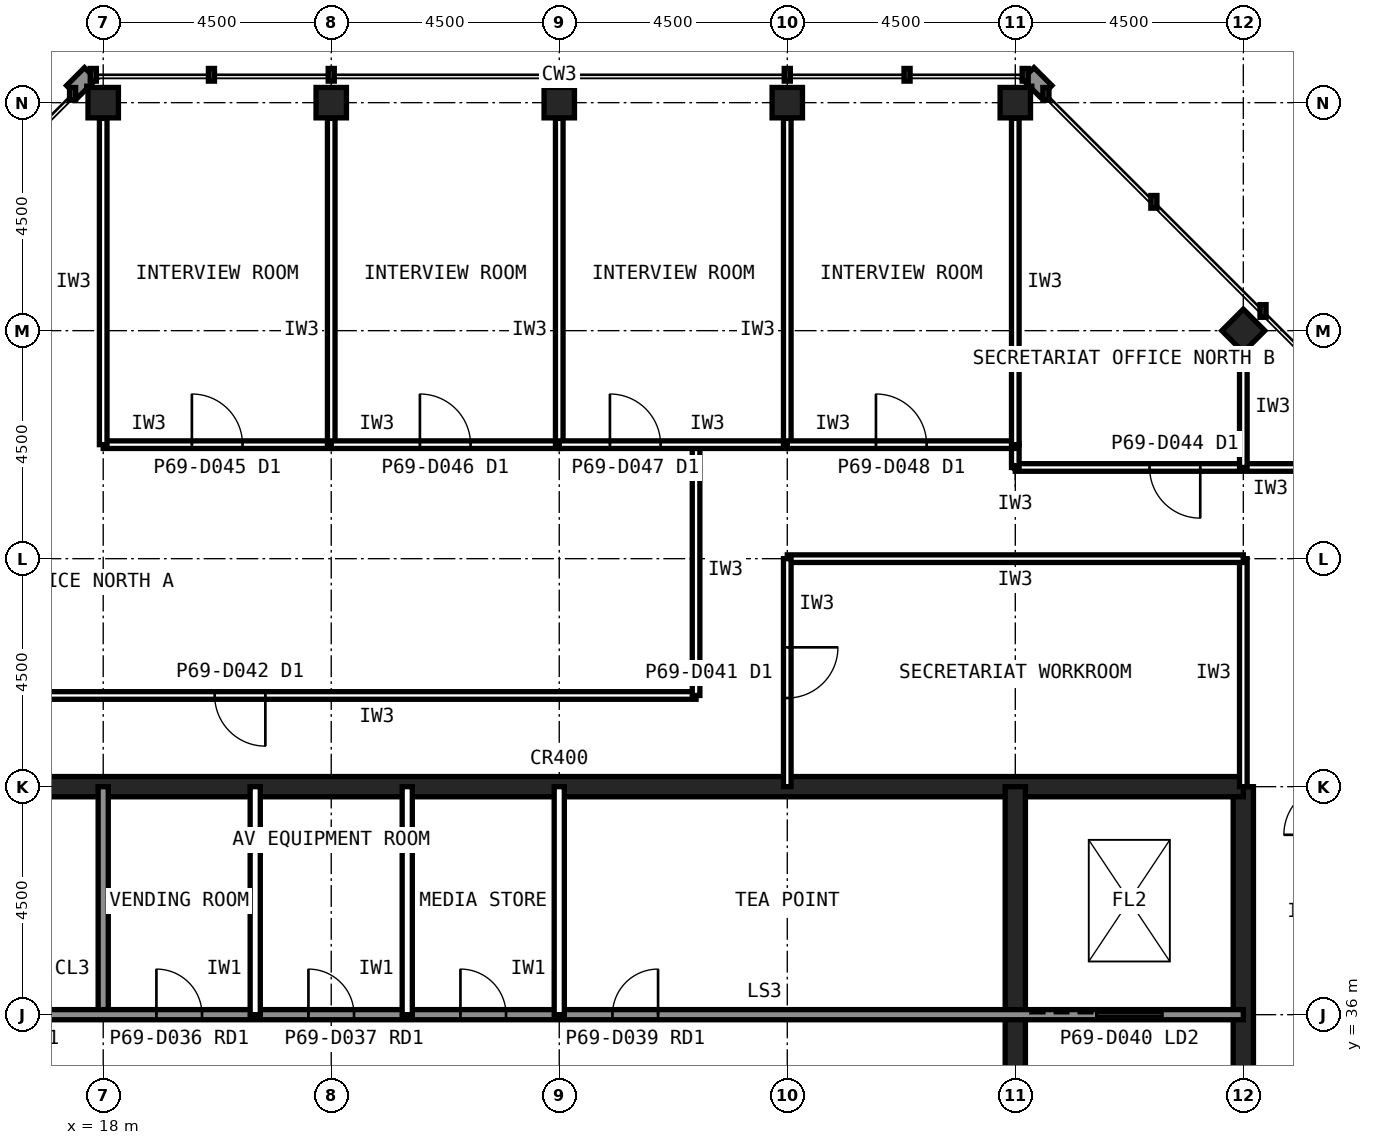
"""IFC4 building model, lengths in metres.
Left out: names, types, materials, properties, quantities, classifications, styles, units other than length and angle.
Written with IfcOpenShell. Run it as: python <this file> out.ifc"""

import sys

from ifc_helpers import new_model, si_unit, direction, frame, frame_2d, origin, origin_2d, place, context, subcontext, project, spatial, rectangle, hollow_rectangle, extrude, element, fill, save


model = new_model("IFC4")
c1 = context("Model", 3, precision=1e-05, world=origin(), true_north=direction((0.0, 1.0)))
c2 = subcontext(c1, "Body", "Model", "MODEL_VIEW")
j1 = project(units=[si_unit("LENGTHUNIT", "METRE"), si_unit("PLANEANGLEUNIT", "RADIAN")], contexts=[c1])
p1 = place(None, origin())
s1 = spatial("IfcSite", under=j1, at=p1, CompositionType="ELEMENT")
p2 = place(p1, origin())
s2 = spatial("IfcBuilding", under=s1, at=p2, CompositionType="ELEMENT")
p3 = place(p2, frame((0.0, 0.0, 286.6)))
s3 = spatial("IfcBuildingStorey", under=s2, at=p3, CompositionType="ELEMENT", Elevation=286.6)
for number, where, z_axis, x_axis in (
    (1, (36.0, 54.0, 0.0), (0.0, 0.0, 1.0), (1.0, 0.0, 0.0)),
    (2, (31.5, 54.0, 0.0), (0.0, 0.0, 1.0), (1.0, 0.0, 0.0)),
    (3, (27.0, 54.0, 0.0), (0.0, 0.0, 1.0), (1.0, 0.0, 0.0)),
    (4, (22.5, 54.0, 0.0), (0.0, 0.0, 1.0), (1.0, 0.0, 0.0)),
    (5, (18.0, 54.0, 0.0), (0.0, 0.0, 1.0), (1.0, 0.0, 0.0)),
    (6, (40.5, 49.5, 0.0), (0.0, 0.0, 1.0), (0.707, 0.707, 0.0)),
):
    element("IfcColumn", number, at=place(p3, frame(where, z_axis=z_axis, x_axis=x_axis)), inside=s3, PredefinedType="COLUMN", context=c2, shape_type="SweptSolid", body=[
        extrude(hollow_rectangle(XDim=0.6, YDim=0.6, WallThickness=0.028, at=origin_2d()), origin(), (0.0, 0.0, 1.0), 4.0),
    ])
p4 = place(p3, frame((40.5, 13.5, 0.0), z_axis=(0.0, 0.0, 1.0), x_axis=(0.0, 1.0, 0.0)))
e7 = element("IfcWall", 7, at=p4, inside=s3, PredefinedType="SHEAR", context=c2, shape_type="SweptSolid", body=[
    extrude(rectangle(XDim=27.0, YDim=0.4, at=frame_2d((13.5, 0.0))), origin(), (0.0, 0.0, 1.0), 4.0),
])
p5 = place(p4, frame((5.85, 0.0, 0.0)))
e8 = element("IfcOpeningElement", 8, at=p5, cuts=e7, PredefinedType="OPENING", context=c2, shape_type="SweptSolid", body=[
    extrude(rectangle(XDim=1.8, YDim=2.1, at=frame_2d((0.9, 1.05))), frame((0.0, 0.21, 0.0), z_axis=(0.0, -1.0, 0.0), x_axis=(1.0, 0.0, 0.0)), (0.0, 0.0, 1.0), 0.42),
])
p6 = place(p4, frame((19.65, 0.0, 0.0)))
e9 = element("IfcOpeningElement", 9, at=p6, cuts=e7, PredefinedType="OPENING", context=c2, shape_type="SweptSolid", body=[
    extrude(rectangle(XDim=1.2, YDim=2.1, at=frame_2d((0.6, 1.05))), frame((0.0, 0.21, 0.0), z_axis=(0.0, -1.0, 0.0), x_axis=(1.0, 0.0, 0.0)), (0.0, 0.0, 1.0), 0.42),
])
p7 = place(p3, frame((40.5, 40.5, 0.0), z_axis=(0.0, 0.0, 1.0), x_axis=(-1.0, 0.0, 0.0)))
e10 = element("IfcWall", 10, at=p7, inside=s3, PredefinedType="SHEAR", context=c2, shape_type="SweptSolid", body=[
    extrude(rectangle(XDim=27.0, YDim=0.4, at=frame_2d((13.5, 0.0))), origin(), (0.0, 0.0, 1.0), 4.0),
])
p8 = place(p3, frame((18.0, 36.0, 0.0), z_axis=(0.0, 0.0, 1.0), x_axis=(0.0, 1.0, 0.0)))
e11 = element("IfcWall", 11, at=p8, inside=s3, PredefinedType="SOLIDWALL", context=c2, shape_type="SweptSolid", body=[
    extrude(rectangle(XDim=4.5, YDim=0.2, at=frame_2d((2.25, 0.0))), origin(), (0.0, 0.0, 1.0), 3.84),
])
p9 = place(p3, frame((36.0, 22.5, 0.0), z_axis=(0.0, 0.0, 1.0), x_axis=(0.0, 1.0, 0.0)))
e12 = element("IfcWall", 12, at=p9, inside=s3, PredefinedType="SHEAR", context=c2, shape_type="SweptSolid", body=[
    extrude(rectangle(XDim=18.0, YDim=0.4, at=frame_2d((9.0, 0.0))), origin(), (0.0, 0.0, 1.0), 4.0),
])
p10 = place(p3, frame((13.5, 36.0, 0.0), z_axis=(0.0, 0.0, 1.0), x_axis=(1.0, 0.0, 0.0)))
e13 = element("IfcWall", 13, at=p10, inside=s3, PredefinedType="SOLIDWALL", context=c2, shape_type="SweptSolid", body=[
    extrude(rectangle(XDim=27.0, YDim=0.2, at=frame_2d((13.5, 0.0))), origin(), (0.0, 0.0, 1.0), 3.84),
])
p11 = place(p10, frame((1.8, 0.0, 0.0)))
e14 = element("IfcOpeningElement", 14, at=p11, cuts=e13, PredefinedType="OPENING", context=c2, shape_type="SweptSolid", body=[
    extrude(rectangle(XDim=0.9, YDim=2.1, at=frame_2d((0.45, 1.05))), frame((0.0, 0.11, 0.0), z_axis=(0.0, -1.0, 0.0), x_axis=(1.0, 0.0, 0.0)), (0.0, 0.0, 1.0), 0.22),
])
p12 = place(p10, frame((5.55, 0.0, 0.0)))
e15 = element("IfcOpeningElement", 15, at=p12, cuts=e13, PredefinedType="OPENING", context=c2, shape_type="SweptSolid", body=[
    extrude(rectangle(XDim=0.9, YDim=2.1, at=frame_2d((0.45, 1.05))), frame((0.0, 0.11, 0.0), z_axis=(0.0, -1.0, 0.0), x_axis=(1.0, 0.0, 0.0)), (0.0, 0.0, 1.0), 0.22),
])
p13 = place(p10, frame((14.55, 0.0, 0.0)))
e16 = element("IfcOpeningElement", 16, at=p13, cuts=e13, PredefinedType="OPENING", context=c2, shape_type="SweptSolid", body=[
    extrude(rectangle(XDim=0.9, YDim=2.1, at=frame_2d((0.45, 1.05))), frame((0.0, 0.11, 0.0), z_axis=(0.0, -1.0, 0.0), x_axis=(1.0, 0.0, 0.0)), (0.0, 0.0, 1.0), 0.22),
])
p14 = place(p10, frame((17.55, 0.0, 0.0)))
e17 = element("IfcOpeningElement", 17, at=p14, cuts=e13, PredefinedType="OPENING", context=c2, shape_type="SweptSolid", body=[
    extrude(rectangle(XDim=0.9, YDim=2.1, at=frame_2d((0.45, 1.05))), frame((0.0, 0.11, 0.0), z_axis=(0.0, -1.0, 0.0), x_axis=(1.0, 0.0, 0.0)), (0.0, 0.0, 1.0), 0.22),
])
p15 = place(p10, frame((24.1, 0.0, 0.0)))
e18 = element("IfcOpeningElement", 18, at=p15, cuts=e13, PredefinedType="OPENING", context=c2, shape_type="SweptSolid", body=[
    extrude(rectangle(XDim=1.3, YDim=2.2, at=frame_2d((0.65, 1.1))), frame((0.0, 0.11, 0.0), z_axis=(0.0, -1.0, 0.0), x_axis=(1.0, 0.0, 0.0)), (0.0, 0.0, 1.0), 0.22),
])
for number, where, z_axis, x_axis in (
    (19, (27.0, 36.0, 0.0), (0.0, 0.0, 1.0), (0.0, 1.0, 0.0)),
    (20, (30.0, 36.0, 0.0), (0.0, 0.0, 1.0), (0.0, 1.0, 0.0)),
):
    element("IfcWall", number, at=place(p3, frame(where, z_axis=z_axis, x_axis=x_axis)), inside=s3, PredefinedType="PARTITIONING", context=c2, shape_type="SweptSolid", body=[
        extrude(rectangle(XDim=4.5, YDim=0.2, at=frame_2d((2.25, 0.0))), origin(), (0.0, 0.0, 1.0), 3.84),
    ])
p16 = place(p3, frame((29.7, 42.3, 0.0), z_axis=(0.0, 0.0, 1.0), x_axis=(-1.0, 0.0, 0.0)))
e21 = element("IfcWall", 21, at=p16, inside=s3, PredefinedType="PARTITIONING", context=c2, shape_type="SweptSolid", body=[
    extrude(rectangle(XDim=18.0, YDim=0.15, at=frame_2d((9.0, 0.0))), origin(), (0.0, 0.0, 1.0), 3.84),
])
p17 = place(p16, frame((8.5, 0.0, 0.0)))
e22 = element("IfcOpeningElement", 22, at=p17, cuts=e21, PredefinedType="OPENING", context=c2, shape_type="SweptSolid", body=[
    extrude(rectangle(XDim=1.0, YDim=2.1, at=frame_2d((0.5, 1.05))), frame((0.0, 0.085, 0.0), z_axis=(0.0, -1.0, 0.0), x_axis=(1.0, 0.0, 0.0)), (0.0, 0.0, 1.0), 0.17),
])
p18 = place(p3, frame((29.7, 47.25, 0.0), z_axis=(0.0, 0.0, 1.0), x_axis=(0.0, -1.0, 0.0)))
e23 = element("IfcWall", 23, at=p18, inside=s3, PredefinedType="PARTITIONING", context=c2, shape_type="SweptSolid", body=[
    extrude(rectangle(XDim=4.95, YDim=0.15, at=frame_2d((2.475, 0.0))), origin(), (0.0, 0.0, 1.0), 3.84),
])
p19 = place(p3, frame((42.3, 46.8, 0.0), z_axis=(0.0, 0.0, 1.0), x_axis=(-1.0, 0.0, 0.0)))
e24 = element("IfcWall", 24, at=p19, inside=s3, PredefinedType="PARTITIONING", context=c2, shape_type="SweptSolid", body=[
    extrude(rectangle(XDim=6.3, YDim=0.15, at=frame_2d((3.15, 0.0))), origin(), (0.0, 0.0, 1.0), 3.84),
])
p20 = place(p19, frame((2.65, 0.0, 0.0)))
e25 = element("IfcOpeningElement", 25, at=p20, cuts=e24, PredefinedType="OPENING", context=c2, shape_type="SweptSolid", body=[
    extrude(rectangle(XDim=1.0, YDim=2.1, at=frame_2d((0.5, 1.05))), frame((0.0, 0.085, 0.0), z_axis=(0.0, -1.0, 0.0), x_axis=(1.0, 0.0, 0.0)), (0.0, 0.0, 1.0), 0.17),
])
p21 = place(p3, frame((36.0, 46.8, 0.0), z_axis=(0.0, 0.0, 1.0), x_axis=(0.0, 1.0, 0.0)))
e26 = element("IfcWall", 26, at=p21, inside=s3, PredefinedType="PARTITIONING", context=c2, shape_type="SweptSolid", body=[
    extrude(rectangle(XDim=0.46, YDim=0.15, at=frame_2d((0.23, 0.0))), origin(), (0.0, 0.0, 1.0), 2.989),
])
p22 = place(p3, frame((40.5, 40.5, 0.0), z_axis=(0.0, 0.0, 1.0), x_axis=(0.0, 1.0, 0.0)))
e27 = element("IfcWall", 27, at=p22, inside=s3, PredefinedType="PARTITIONING", context=c2, shape_type="SweptSolid", body=[
    extrude(rectangle(XDim=4.5, YDim=0.15, at=frame_2d((2.25, 0.0))), origin(), (0.0, 0.0, 1.0), 2.989),
])
p23 = place(p3, frame((40.5, 45.0, 0.0), z_axis=(0.0, 0.0, 1.0), x_axis=(-1.0, 0.0, 0.0)))
e28 = element("IfcWall", 28, at=p23, inside=s3, PredefinedType="PARTITIONING", context=c2, shape_type="SweptSolid", body=[
    extrude(rectangle(XDim=9.0, YDim=0.15, at=frame_2d((4.5, 0.0))), origin(), (0.0, 0.0, 1.0), 3.84),
])
p24 = place(p3, frame((31.5, 45.0, 0.0), z_axis=(0.0, 0.0, 1.0), x_axis=(0.0, -1.0, 0.0)))
e29 = element("IfcWall", 29, at=p24, inside=s3, PredefinedType="PARTITIONING", context=c2, shape_type="SweptSolid", body=[
    extrude(rectangle(XDim=4.5, YDim=0.15, at=frame_2d((2.25, 0.0))), origin(), (0.0, 0.0, 1.0), 2.989),
])
p25 = place(p24, frame((1.75, 0.0, 0.0)))
e30 = element("IfcOpeningElement", 30, at=p25, cuts=e29, PredefinedType="OPENING", context=c2, shape_type="SweptSolid", body=[
    extrude(rectangle(XDim=1.0, YDim=2.1, at=frame_2d((0.5, 1.05))), frame((0.0, 0.085, 0.0), z_axis=(0.0, -1.0, 0.0), x_axis=(1.0, 0.0, 0.0)), (0.0, 0.0, 1.0), 0.17),
])
p26 = place(p3, frame((18.0, 47.25, 0.0), z_axis=(0.0, 0.0, 1.0), x_axis=(1.0, 0.0, 0.0)))
e31 = element("IfcWall", 31, at=p26, inside=s3, PredefinedType="PARTITIONING", context=c2, shape_type="SweptSolid", body=[
    extrude(rectangle(XDim=4.5, YDim=0.15, at=frame_2d((2.25, 0.0))), origin(), (0.0, 0.0, 1.0), 3.84),
])
p27 = place(p26, frame((1.75, 0.0, 0.0)))
e32 = element("IfcOpeningElement", 32, at=p27, cuts=e31, PredefinedType="OPENING", context=c2, shape_type="SweptSolid", body=[
    extrude(rectangle(XDim=1.0, YDim=2.1, at=frame_2d((0.5, 1.05))), frame((0.0, 0.085, 0.0), z_axis=(0.0, -1.0, 0.0), x_axis=(1.0, 0.0, 0.0)), (0.0, 0.0, 1.0), 0.17),
])
for number, where, z_axis, x_axis in (
    (33, (22.5, 47.25, 0.0), (0.0, 0.0, 1.0), (0.0, 1.0, 0.0)),
    (34, (18.0, 53.69, 0.0), (0.0, 0.0, 1.0), (0.0, -1.0, 0.0)),
):
    element("IfcWall", number, at=place(p3, frame(where, z_axis=z_axis, x_axis=x_axis)), inside=s3, PredefinedType="PARTITIONING", context=c2, shape_type="SweptSolid", body=[
        extrude(rectangle(XDim=6.44, YDim=0.15, at=frame_2d((3.22, 0.0))), origin(), (0.0, 0.0, 1.0), 2.989),
    ])
p28 = place(p3, frame((22.5, 47.25, 0.0), z_axis=(0.0, 0.0, 1.0), x_axis=(1.0, 0.0, 0.0)))
e35 = element("IfcWall", 35, at=p28, inside=s3, PredefinedType="PARTITIONING", context=c2, shape_type="SweptSolid", body=[
    extrude(rectangle(XDim=4.5, YDim=0.15, at=frame_2d((2.25, 0.0))), origin(), (0.0, 0.0, 1.0), 3.84),
])
p29 = place(p28, frame((1.75, 0.0, 0.0)))
e36 = element("IfcOpeningElement", 36, at=p29, cuts=e35, PredefinedType="OPENING", context=c2, shape_type="SweptSolid", body=[
    extrude(rectangle(XDim=1.0, YDim=2.1, at=frame_2d((0.5, 1.05))), frame((0.0, 0.085, 0.0), z_axis=(0.0, -1.0, 0.0), x_axis=(1.0, 0.0, 0.0)), (0.0, 0.0, 1.0), 0.17),
])
p30 = place(p3, frame((27.0, 47.25, 0.0), z_axis=(0.0, 0.0, 1.0), x_axis=(0.0, 1.0, 0.0)))
e37 = element("IfcWall", 37, at=p30, inside=s3, PredefinedType="PARTITIONING", context=c2, shape_type="SweptSolid", body=[
    extrude(rectangle(XDim=6.44, YDim=0.15, at=frame_2d((3.22, 0.0))), origin(), (0.0, 0.0, 1.0), 2.989),
])
p31 = place(p3, frame((27.0, 47.25, 0.0), z_axis=(0.0, 0.0, 1.0), x_axis=(1.0, 0.0, 0.0)))
e38 = element("IfcWall", 38, at=p31, inside=s3, PredefinedType="PARTITIONING", context=c2, shape_type="SweptSolid", body=[
    extrude(rectangle(XDim=4.5, YDim=0.15, at=frame_2d((2.25, 0.0))), origin(), (0.0, 0.0, 1.0), 3.84),
])
p32 = place(p31, frame((1.0, 0.0, 0.0)))
e39 = element("IfcOpeningElement", 39, at=p32, cuts=e38, PredefinedType="OPENING", context=c2, shape_type="SweptSolid", body=[
    extrude(rectangle(XDim=1.0, YDim=2.1, at=frame_2d((0.5, 1.05))), frame((0.0, 0.085, 0.0), z_axis=(0.0, -1.0, 0.0), x_axis=(1.0, 0.0, 0.0)), (0.0, 0.0, 1.0), 0.17),
])
p33 = place(p3, frame((31.5, 47.25, 0.0), z_axis=(0.0, 0.0, 1.0), x_axis=(0.0, 1.0, 0.0)))
e40 = element("IfcWall", 40, at=p33, inside=s3, PredefinedType="PARTITIONING", context=c2, shape_type="SweptSolid", body=[
    extrude(rectangle(XDim=6.44, YDim=0.15, at=frame_2d((3.22, 0.0))), origin(), (0.0, 0.0, 1.0), 2.989),
])
p34 = place(p3, frame((31.5, 47.25, 0.0), z_axis=(0.0, 0.0, 1.0), x_axis=(1.0, 0.0, 0.0)))
e41 = element("IfcWall", 41, at=p34, inside=s3, PredefinedType="PARTITIONING", context=c2, shape_type="SweptSolid", body=[
    extrude(rectangle(XDim=4.5, YDim=0.15, at=frame_2d((2.25, 0.0))), origin(), (0.0, 0.0, 1.0), 3.84),
])
p35 = place(p34, frame((1.75, 0.0, 0.0)))
e42 = element("IfcOpeningElement", 42, at=p35, cuts=e41, PredefinedType="OPENING", context=c2, shape_type="SweptSolid", body=[
    extrude(rectangle(XDim=1.0, YDim=2.1, at=frame_2d((0.5, 1.05))), frame((0.0, 0.085, 0.0), z_axis=(0.0, -1.0, 0.0), x_axis=(1.0, 0.0, 0.0)), (0.0, 0.0, 1.0), 0.17),
])
p36 = place(p3, frame((36.0, 47.25, 0.0), z_axis=(0.0, 0.0, 1.0), x_axis=(0.0, 1.0, 0.0)))
e43 = element("IfcWall", 43, at=p36, inside=s3, PredefinedType="PARTITIONING", context=c2, shape_type="SweptSolid", body=[
    extrude(rectangle(XDim=6.44, YDim=0.15, at=frame_2d((3.22, 0.0))), origin(), (0.0, 0.0, 1.0), 2.989),
])
p37 = place(p3, frame((40.5, 49.18, 0.0), z_axis=(0.0, 0.0, 1.0), x_axis=(0.0, -1.0, 0.0)))
e44 = element("IfcWall", 44, at=p37, inside=s3, PredefinedType="PARTITIONING", context=c2, shape_type="SweptSolid", body=[
    extrude(rectangle(XDim=2.38, YDim=0.15, at=frame_2d((1.19, 0.0))), origin(), (0.0, 0.0, 1.0), 2.989),
])
p38 = place(p12, origin())
e45 = element("IfcDoor", 45, at=p38, inside=s3, OperationType="SINGLE_SWING_LEFT", PredefinedType="DOOR", context=c2, shape_type="SweptSolid", body=[
    extrude(rectangle(XDim=0.9, YDim=2.1, at=frame_2d((0.45, 1.05))), frame((0.0, 0.025, 0.0), z_axis=(0.0, -1.0, 0.0), x_axis=(1.0, 0.0, 0.0)), (0.0, 0.0, 1.0), 0.05),
])
fill(e15, e45)
p39 = place(p13, origin())
e46 = element("IfcDoor", 46, at=p39, inside=s3, OperationType="SINGLE_SWING_RIGHT", PredefinedType="DOOR", context=c2, shape_type="SweptSolid", body=[
    extrude(rectangle(XDim=0.9, YDim=2.1, at=frame_2d((0.45, 1.05))), frame((0.0, 0.025, 0.0), z_axis=(0.0, -1.0, 0.0), x_axis=(1.0, 0.0, 0.0)), (0.0, 0.0, 1.0), 0.05),
])
fill(e16, e46)
p40 = place(p14, origin())
e47 = element("IfcDoor", 47, at=p40, inside=s3, OperationType="SINGLE_SWING_RIGHT", PredefinedType="DOOR", context=c2, shape_type="SweptSolid", body=[
    extrude(rectangle(XDim=0.9, YDim=2.1, at=frame_2d((0.45, 1.05))), frame((0.0, 0.025, 0.0), z_axis=(0.0, -1.0, 0.0), x_axis=(1.0, 0.0, 0.0)), (0.0, 0.0, 1.0), 0.05),
])
fill(e17, e47)
p41 = place(p15, origin())
e48 = element("IfcDoor", 48, at=p41, inside=s3, OperationType="SLIDING_TO_LEFT", PredefinedType="DOOR", context=c2, shape_type="SweptSolid", body=[
    extrude(rectangle(XDim=1.3, YDim=2.2, at=frame_2d((0.65, 1.1))), frame((0.0, 0.025, 0.0), z_axis=(0.0, -1.0, 0.0), x_axis=(1.0, 0.0, 0.0)), (0.0, 0.0, 1.0), 0.05),
])
fill(e18, e48)
p42 = place(p17, origin())
e49 = element("IfcDoor", 49, at=p42, inside=s3, OperationType="SINGLE_SWING_LEFT", PredefinedType="DOOR", context=c2, shape_type="SweptSolid", body=[
    extrude(rectangle(XDim=1.0, YDim=2.1, at=frame_2d((0.5, 1.05))), frame((0.0, 0.025, 0.0), z_axis=(0.0, -1.0, 0.0), x_axis=(1.0, 0.0, 0.0)), (0.0, 0.0, 1.0), 0.05),
])
fill(e22, e49)
p43 = place(p20, origin())
e50 = element("IfcDoor", 50, at=p43, inside=s3, OperationType="SINGLE_SWING_LEFT", PredefinedType="DOOR", context=c2, shape_type="SweptSolid", body=[
    extrude(rectangle(XDim=1.0, YDim=2.1, at=frame_2d((0.5, 1.05))), frame((0.0, 0.025, 0.0), z_axis=(0.0, -1.0, 0.0), x_axis=(1.0, 0.0, 0.0)), (0.0, 0.0, 1.0), 0.05),
])
fill(e25, e50)
p44 = place(p25, origin())
e51 = element("IfcDoor", 51, at=p44, inside=s3, OperationType="SINGLE_SWING_LEFT", PredefinedType="DOOR", context=c2, shape_type="SweptSolid", body=[
    extrude(rectangle(XDim=1.0, YDim=2.1, at=frame_2d((0.5, 1.05))), frame((0.0, 0.025, 0.0), z_axis=(0.0, -1.0, 0.0), x_axis=(1.0, 0.0, 0.0)), (0.0, 0.0, 1.0), 0.05),
])
fill(e30, e51)
p45 = place(p27, origin())
e52 = element("IfcDoor", 52, at=p45, inside=s3, OperationType="SINGLE_SWING_LEFT", PredefinedType="DOOR", context=c2, shape_type="SweptSolid", body=[
    extrude(rectangle(XDim=1.0, YDim=2.1, at=frame_2d((0.5, 1.05))), frame((0.0, 0.025, 0.0), z_axis=(0.0, -1.0, 0.0), x_axis=(1.0, 0.0, 0.0)), (0.0, 0.0, 1.0), 0.05),
])
fill(e32, e52)
p46 = place(p29, origin())
e53 = element("IfcDoor", 53, at=p46, inside=s3, OperationType="SINGLE_SWING_LEFT", PredefinedType="DOOR", context=c2, shape_type="SweptSolid", body=[
    extrude(rectangle(XDim=1.0, YDim=2.1, at=frame_2d((0.5, 1.05))), frame((0.0, 0.025, 0.0), z_axis=(0.0, -1.0, 0.0), x_axis=(1.0, 0.0, 0.0)), (0.0, 0.0, 1.0), 0.05),
])
fill(e36, e53)
p47 = place(p32, origin())
e54 = element("IfcDoor", 54, at=p47, inside=s3, OperationType="SINGLE_SWING_LEFT", PredefinedType="DOOR", context=c2, shape_type="SweptSolid", body=[
    extrude(rectangle(XDim=1.0, YDim=2.1, at=frame_2d((0.5, 1.05))), frame((0.0, 0.025, 0.0), z_axis=(0.0, -1.0, 0.0), x_axis=(1.0, 0.0, 0.0)), (0.0, 0.0, 1.0), 0.05),
])
fill(e39, e54)
p48 = place(p35, origin())
e55 = element("IfcDoor", 55, at=p48, inside=s3, OperationType="SINGLE_SWING_LEFT", PredefinedType="DOOR", context=c2, shape_type="SweptSolid", body=[
    extrude(rectangle(XDim=1.0, YDim=2.1, at=frame_2d((0.5, 1.05))), frame((0.0, 0.025, 0.0), z_axis=(0.0, -1.0, 0.0), x_axis=(1.0, 0.0, 0.0)), (0.0, 0.0, 1.0), 0.05),
])
fill(e42, e55)
save(model, sys.argv[1])
